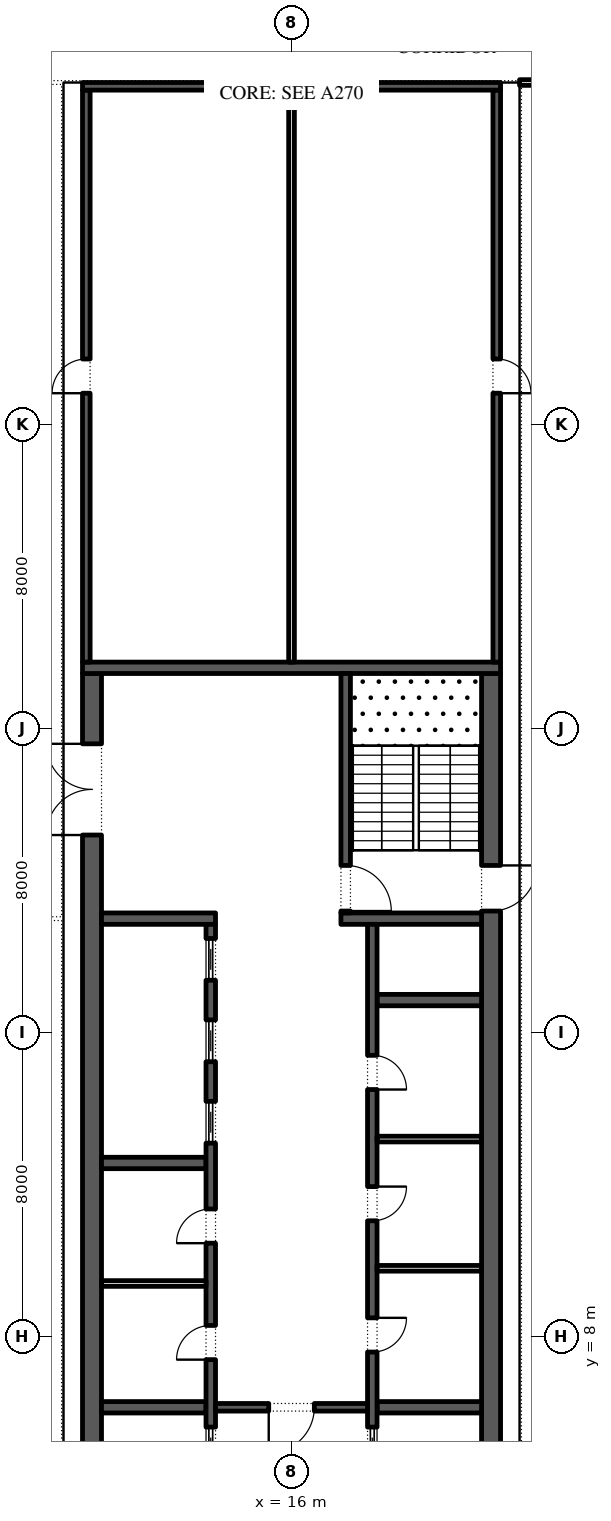
"""IFC4 building model, lengths in metres.
Left out: names, types, materials, properties, quantities, classifications, styles, units other than length and angle.
Written with IfcOpenShell. Run it as: python <this file> out.ifc"""

import sys

from ifc_helpers import new_model, si_unit, direction, frame, frame_2d, origin, place, context, subcontext, project, spatial, rectangle, extrude, element, fill, save


model = new_model("IFC4")
c1 = context("Model", 3, precision=1e-05, world=origin(), true_north=direction((0.0, 1.0)))
c2 = subcontext(c1, "Body", "Model", "MODEL_VIEW")
j1 = project(units=[si_unit("LENGTHUNIT", "METRE"), si_unit("PLANEANGLEUNIT", "RADIAN")], contexts=[c1])
p1 = place(None, origin())
s1 = spatial("IfcSite", under=j1, at=p1, CompositionType="ELEMENT")
p2 = place(p1, origin())
s2 = spatial("IfcBuilding", under=s1, at=p2, CompositionType="ELEMENT")
p3 = place(p2, frame((0.0, 0.0, 309.0)))
s3 = spatial("IfcBuildingStorey", under=s2, at=p3, CompositionType="ELEMENT", Elevation=309.0)
p4 = place(p3, frame((21.25, -2.45, 0.0), z_axis=(0.0, 0.0, 1.0), x_axis=(0.0, 1.0, 0.0)))
e1 = element("IfcWall", 1, at=p4, inside=s3, PredefinedType="SHEAR", context=c2, shape_type="SweptSolid", body=[
    extrude(rectangle(XDim=27.9, YDim=0.5, at=frame_2d((13.95, 0.0))), origin(), (0.0, 0.0, 1.0), 4.0),
])
p5 = place(p4, frame((5.05, 0.0, 0.0)))
e2 = element("IfcOpeningElement", 2, at=p5, cuts=e1, PredefinedType="OPENING", context=c2, shape_type="SweptSolid", body=[
    extrude(rectangle(XDim=1.2, YDim=2.1, at=frame_2d((0.6, 1.05))), frame((0.0, 0.26, 0.0), z_axis=(0.0, -1.0, 0.0), x_axis=(1.0, 0.0, 0.0)), (0.0, 0.0, 1.0), 0.52),
])
p6 = place(p4, frame((21.65, 0.0, 0.0)))
e3 = element("IfcOpeningElement", 3, at=p6, cuts=e1, PredefinedType="OPENING", context=c2, shape_type="SweptSolid", body=[
    extrude(rectangle(XDim=1.2, YDim=2.1, at=frame_2d((0.6, 1.05))), frame((0.0, 0.26, 0.0), z_axis=(0.0, -1.0, 0.0), x_axis=(1.0, 0.0, 0.0)), (0.0, 0.0, 1.0), 0.52),
])
p7 = place(p3, frame((10.75, -2.45, 0.0), z_axis=(0.0, 0.0, 1.0), x_axis=(0.0, 1.0, 0.0)))
e4 = element("IfcWall", 4, at=p7, inside=s3, PredefinedType="SHEAR", context=c2, shape_type="SweptSolid", body=[
    extrude(rectangle(XDim=27.9, YDim=0.5, at=frame_2d((13.95, 0.0))), origin(), (0.0, 0.0, 1.0), 4.0),
])
p8 = place(p7, frame((23.65, 0.0, 0.0)))
e5 = element("IfcOpeningElement", 5, at=p8, cuts=e4, PredefinedType="OPENING", context=c2, shape_type="SweptSolid", body=[
    extrude(rectangle(XDim=2.4, YDim=2.1, at=frame_2d((1.2, 1.05))), frame((0.0, 0.26, 0.0), z_axis=(0.0, -1.0, 0.0), x_axis=(1.0, 0.0, 0.0)), (0.0, 0.0, 1.0), 0.52),
])
p9 = place(p7, frame((1.387, 0.0, 0.0)))
e6 = element("IfcOpeningElement", 6, at=p9, cuts=e4, PredefinedType="OPENING", context=c2, shape_type="SweptSolid", body=[
    extrude(rectangle(XDim=0.9, YDim=2.1, at=frame_2d((0.45, 1.05))), frame((0.0, 0.26, 0.0), z_axis=(0.0, -1.0, 0.0), x_axis=(1.0, 0.0, 0.0)), (0.0, 0.0, 1.0), 0.52),
])
p10 = place(p7, frame((4.562, 0.0, 0.0)))
e7 = element("IfcOpeningElement", 7, at=p10, cuts=e4, PredefinedType="OPENING", context=c2, shape_type="SweptSolid", body=[
    extrude(rectangle(XDim=1.0, YDim=2.1, at=frame_2d((0.5, 1.05))), frame((0.0, 0.26, 0.0), z_axis=(0.0, -1.0, 0.0), x_axis=(1.0, 0.0, 0.0)), (0.0, 0.0, 1.0), 0.52),
])
p11 = place(p3, frame((10.5, 25.6, 0.0), z_axis=(0.0, 0.0, 1.0), x_axis=(1.0, 0.0, 0.0)))
e8 = element("IfcWall", 8, at=p11, inside=s3, PredefinedType="SHEAR", context=c2, shape_type="SweptSolid", body=[
    extrude(rectangle(XDim=11.0, YDim=0.3, at=frame_2d((5.5, 0.0))), origin(), (0.0, 0.0, 1.0), 4.0),
])
p12 = place(p3, frame((17.3, 19.0, 0.0), z_axis=(0.0, 0.0, 1.0), x_axis=(1.0, 0.0, 0.0)))
e9 = element("IfcWall", 9, at=p12, inside=s3, PredefinedType="SHEAR", context=c2, shape_type="SweptSolid", body=[
    extrude(rectangle(XDim=3.7, YDim=0.3, at=frame_2d((1.85, 0.0))), origin(), (0.0, 0.0, 1.0), 4.0),
])
p13 = place(p3, frame((17.425, 19.15, 0.0), z_axis=(0.0, 0.0, 1.0), x_axis=(0.0, 1.0, 0.0)))
e10 = element("IfcWall", 10, at=p13, inside=s3, PredefinedType="SHEAR", context=c2, shape_type="SweptSolid", body=[
    extrude(rectangle(XDim=6.3, YDim=0.25, at=frame_2d((3.15, 0.0))), origin(), (0.0, 0.0, 1.0), 4.0),
])
p14 = place(p13, frame((0.05, 0.0, 0.0)))
e11 = element("IfcOpeningElement", 11, at=p14, cuts=e10, PredefinedType="OPENING", context=c2, shape_type="SweptSolid", body=[
    extrude(rectangle(XDim=1.2, YDim=2.1, at=frame_2d((0.6, 1.05))), frame((0.0, 0.135, 0.0), z_axis=(0.0, -1.0, 0.0), x_axis=(1.0, 0.0, 0.0)), (0.0, 0.0, 1.0), 0.27),
])
for number, where, z_axis, x_axis in (
    (12, (18.25, 6.143, 0.0), (0.0, 0.0, 1.0), (1.0, 0.0, 0.0)),
    (13, (18.25, 16.857, 0.0), (0.0, 0.0, 1.0), (1.0, 0.0, 0.0)),
):
    element("IfcWall", number, at=place(p3, frame(where, z_axis=z_axis, x_axis=x_axis)), inside=s3, PredefinedType="SHEAR", context=c2, shape_type="SweptSolid", body=[
        extrude(rectangle(XDim=2.75, YDim=0.3, at=frame_2d((1.375, 0.0))), origin(), (0.0, 0.0, 1.0), 4.0),
    ])
p15 = place(p3, frame((18.125, 4.15, 0.0), z_axis=(0.0, 0.0, 1.0), x_axis=(0.0, 1.0, 0.0)))
e14 = element("IfcWall", 14, at=p15, inside=s3, PredefinedType="SHEAR", context=c2, shape_type="SweptSolid", body=[
    extrude(rectangle(XDim=14.7, YDim=0.25, at=frame_2d((7.35, 0.0))), origin(), (0.0, 0.0, 1.0), 4.0),
])
p16 = place(p15, frame((3.446, 0.0, 0.0)))
e15 = element("IfcOpeningElement", 15, at=p16, cuts=e14, PredefinedType="OPENING", context=c2, shape_type="SweptSolid", body=[
    extrude(rectangle(XDim=0.9, YDim=2.1, at=frame_2d((0.45, 1.05))), frame((0.0, 0.135, 0.0), z_axis=(0.0, -1.0, 0.0), x_axis=(1.0, 0.0, 0.0)), (0.0, 0.0, 1.0), 0.27),
])
p17 = place(p15, frame((6.9, 0.0, 0.0)))
e16 = element("IfcOpeningElement", 16, at=p17, cuts=e14, PredefinedType="OPENING", context=c2, shape_type="SweptSolid", body=[
    extrude(rectangle(XDim=0.9, YDim=2.1, at=frame_2d((0.45, 1.05))), frame((0.0, 0.135, 0.0), z_axis=(0.0, -1.0, 0.0), x_axis=(1.0, 0.0, 0.0)), (0.0, 0.0, 1.0), 0.27),
])
p18 = place(p15, frame((10.354, 0.0, 0.0)))
e17 = element("IfcOpeningElement", 17, at=p18, cuts=e14, PredefinedType="OPENING", context=c2, shape_type="SweptSolid", body=[
    extrude(rectangle(XDim=0.9, YDim=2.1, at=frame_2d((0.45, 1.05))), frame((0.0, 0.135, 0.0), z_axis=(0.0, -1.0, 0.0), x_axis=(1.0, 0.0, 0.0)), (0.0, 0.0, 1.0), 0.27),
])
p19 = place(p15, frame((0.371, 0.0, 0.0)))
e18 = element("IfcOpeningElement", 18, at=p19, cuts=e14, PredefinedType="OPENING", context=c2, shape_type="SweptSolid", body=[
    extrude(rectangle(XDim=1.1, YDim=2.1, at=frame_2d((0.55, 1.05))), frame((0.0, 0.135, 0.0), z_axis=(0.0, -1.0, 0.0), x_axis=(1.0, 0.0, 0.0)), (0.0, 0.0, 1.0), 0.27),
])
for number, where, z_axis, x_axis in (
    (19, (18.25, 9.8, 0.0), (0.0, 0.0, 1.0), (1.0, 0.0, 0.0)),
    (20, (18.25, 13.2, 0.0), (0.0, 0.0, 1.0), (1.0, 0.0, 0.0)),
):
    element("IfcWall", number, at=place(p3, frame(where, z_axis=z_axis, x_axis=x_axis)), inside=s3, PredefinedType="PARTITIONING", context=c2, shape_type="SweptSolid", body=[
        extrude(rectangle(XDim=2.75, YDim=0.15, at=frame_2d((1.375, 0.0))), origin(), (0.0, 0.0, 1.0), 4.0),
    ])
for number, where, z_axis, x_axis in (
    (21, (11.0, 6.143, 0.0), (0.0, 0.0, 1.0), (1.0, 0.0, 0.0)),
    (22, (11.0, 12.571, 0.0), (0.0, 0.0, 1.0), (1.0, 0.0, 0.0)),
):
    element("IfcWall", number, at=place(p3, frame(where, z_axis=z_axis, x_axis=x_axis)), inside=s3, PredefinedType="SHEAR", context=c2, shape_type="SweptSolid", body=[
        extrude(rectangle(XDim=2.75, YDim=0.3, at=frame_2d((1.375, 0.0))), origin(), (0.0, 0.0, 1.0), 4.0),
    ])
p20 = place(p3, frame((11.0, 19.0, 0.0), z_axis=(0.0, 0.0, 1.0), x_axis=(1.0, 0.0, 0.0)))
e23 = element("IfcWall", 23, at=p20, inside=s3, PredefinedType="SHEAR", context=c2, shape_type="SweptSolid", body=[
    extrude(rectangle(XDim=3.0, YDim=0.3, at=frame_2d((1.5, 0.0))), origin(), (0.0, 0.0, 1.0), 4.0),
])
p21 = place(p3, frame((13.875, -2.45, 0.0), z_axis=(0.0, 0.0, 1.0), x_axis=(0.0, 1.0, 0.0)))
e24 = element("IfcWall", 24, at=p21, inside=s3, PredefinedType="SHEAR", context=c2, shape_type="SweptSolid", body=[
    extrude(rectangle(XDim=21.3, YDim=0.25, at=frame_2d((10.65, 0.0))), origin(), (0.0, 0.0, 1.0), 4.0),
])
p22 = place(p21, frame((9.846, 0.0, 0.0)))
e25 = element("IfcOpeningElement", 25, at=p22, cuts=e24, PredefinedType="OPENING", context=c2, shape_type="SweptSolid", body=[
    extrude(rectangle(XDim=0.9, YDim=2.1, at=frame_2d((0.45, 1.05))), frame((0.0, 0.135, 0.0), z_axis=(0.0, -1.0, 0.0), x_axis=(1.0, 0.0, 0.0)), (0.0, 0.0, 1.0), 0.27),
])
p23 = place(p21, frame((12.911, 0.0, 0.0)))
e26 = element("IfcOpeningElement", 26, at=p23, cuts=e24, PredefinedType="OPENING", context=c2, shape_type="SweptSolid", body=[
    extrude(rectangle(XDim=0.9, YDim=2.1, at=frame_2d((0.45, 1.05))), frame((0.0, 0.135, 0.0), z_axis=(0.0, -1.0, 0.0), x_axis=(1.0, 0.0, 0.0)), (0.0, 0.0, 1.0), 0.27),
])
p24 = place(p21, frame((6.971, 0.0, 0.0)))
e27 = element("IfcOpeningElement", 27, at=p24, cuts=e24, PredefinedType="OPENING", context=c2, shape_type="SweptSolid", body=[
    extrude(rectangle(XDim=1.1, YDim=2.1, at=frame_2d((0.55, 1.05))), frame((0.0, 0.135, 0.0), z_axis=(0.0, -1.0, 0.0), x_axis=(1.0, 0.0, 0.0)), (0.0, 0.0, 1.0), 0.27),
])
p25 = place(p21, frame((15.543, 0.0, 0.0)))
e28 = element("IfcOpeningElement", 28, at=p25, cuts=e24, PredefinedType="OPENING", context=c2, shape_type="SweptSolid", body=[
    extrude(rectangle(XDim=1.1, YDim=2.1, at=frame_2d((0.55, 1.05))), frame((0.0, 0.135, 0.0), z_axis=(0.0, -1.0, 0.0), x_axis=(1.0, 0.0, 0.0)), (0.0, 0.0, 1.0), 0.27),
])
p26 = place(p21, frame((17.686, 0.0, 0.0)))
e29 = element("IfcOpeningElement", 29, at=p26, cuts=e24, PredefinedType="OPENING", context=c2, shape_type="SweptSolid", body=[
    extrude(rectangle(XDim=1.1, YDim=2.1, at=frame_2d((0.55, 1.05))), frame((0.0, 0.135, 0.0), z_axis=(0.0, -1.0, 0.0), x_axis=(1.0, 0.0, 0.0)), (0.0, 0.0, 1.0), 0.27),
])
p27 = place(p21, frame((19.829, 0.0, 0.0)))
e30 = element("IfcOpeningElement", 30, at=p27, cuts=e24, PredefinedType="OPENING", context=c2, shape_type="SweptSolid", body=[
    extrude(rectangle(XDim=1.1, YDim=2.1, at=frame_2d((0.55, 1.05))), frame((0.0, 0.135, 0.0), z_axis=(0.0, -1.0, 0.0), x_axis=(1.0, 0.0, 0.0)), (0.0, 0.0, 1.0), 0.27),
])
p28 = place(p3, frame((11.0, 9.4, 0.0), z_axis=(0.0, 0.0, 1.0), x_axis=(1.0, 0.0, 0.0)))
e31 = element("IfcWall", 31, at=p28, inside=s3, PredefinedType="PARTITIONING", context=c2, shape_type="SweptSolid", body=[
    extrude(rectangle(XDim=2.75, YDim=0.15, at=frame_2d((1.375, 0.0))), origin(), (0.0, 0.0, 1.0), 4.0),
])
p29 = place(p3, frame((14.0, 6.143, 0.0), z_axis=(0.0, 0.0, 1.0), x_axis=(1.0, 0.0, 0.0)))
e32 = element("IfcWall", 32, at=p29, inside=s3, PredefinedType="SHEAR", context=c2, shape_type="SweptSolid", body=[
    extrude(rectangle(XDim=4.0, YDim=0.2, at=frame_2d((2.0, 0.0))), origin(), (0.0, 0.0, 1.0), 4.0),
])
p30 = place(p29, frame((1.4, 0.0, 0.0)))
e33 = element("IfcOpeningElement", 33, at=p30, cuts=e32, PredefinedType="OPENING", context=c2, shape_type="SweptSolid", body=[
    extrude(rectangle(XDim=1.2, YDim=2.1, at=frame_2d((0.6, 1.05))), frame((0.0, 0.11, 0.0), z_axis=(0.0, -1.0, 0.0), x_axis=(1.0, 0.0, 0.0)), (0.0, 0.0, 1.0), 0.22),
])
p31 = place(p3, frame((21.4, 25.75, 0.0), z_axis=(0.0, 0.0, 1.0), x_axis=(0.0, 1.0, 0.0)))
e34 = element("IfcWall", 34, at=p31, inside=s3, PredefinedType="SHEAR", context=c2, shape_type="SweptSolid", body=[
    extrude(rectangle(XDim=15.05, YDim=0.2, at=frame_2d((7.525, 0.0))), origin(), (0.0, 0.0, 1.0), 4.0),
])
p32 = place(p31, frame((7.075, 0.0, 0.0)))
e35 = element("IfcOpeningElement", 35, at=p32, cuts=e34, PredefinedType="OPENING", context=c2, shape_type="SweptSolid", body=[
    extrude(rectangle(XDim=0.9, YDim=2.1, at=frame_2d((0.45, 1.05))), frame((0.0, 0.11, 0.0), z_axis=(0.0, -1.0, 0.0), x_axis=(1.0, 0.0, 0.0)), (0.0, 0.0, 1.0), 0.22),
])
p33 = place(p3, frame((10.6, 25.75, 0.0), z_axis=(0.0, 0.0, 1.0), x_axis=(0.0, 1.0, 0.0)))
e36 = element("IfcWall", 36, at=p33, inside=s3, PredefinedType="SHEAR", context=c2, shape_type="SweptSolid", body=[
    extrude(rectangle(XDim=15.05, YDim=0.2, at=frame_2d((7.525, 0.0))), origin(), (0.0, 0.0, 1.0), 4.0),
])
p34 = place(p33, frame((7.075, 0.0, 0.0)))
e37 = element("IfcOpeningElement", 37, at=p34, cuts=e36, PredefinedType="OPENING", context=c2, shape_type="SweptSolid", body=[
    extrude(rectangle(XDim=0.9, YDim=2.1, at=frame_2d((0.45, 1.05))), frame((0.0, 0.11, 0.0), z_axis=(0.0, -1.0, 0.0), x_axis=(1.0, 0.0, 0.0)), (0.0, 0.0, 1.0), 0.22),
])
p35 = place(p3, frame((10.5, 40.9, 0.0), z_axis=(0.0, 0.0, 1.0), x_axis=(1.0, 0.0, 0.0)))
e38 = element("IfcWall", 38, at=p35, inside=s3, PredefinedType="SHEAR", context=c2, shape_type="SweptSolid", body=[
    extrude(rectangle(XDim=11.0, YDim=0.2, at=frame_2d((5.5, 0.0))), origin(), (0.0, 0.0, 1.0), 4.0),
])
p36 = place(p3, frame((16.0, 25.75, 0.0), z_axis=(0.0, 0.0, 1.0), x_axis=(0.0, 1.0, 0.0)))
e39 = element("IfcWall", 39, at=p36, inside=s3, PredefinedType="PARTITIONING", context=c2, shape_type="SweptSolid", body=[
    extrude(rectangle(XDim=15.05, YDim=0.15, at=frame_2d((7.525, 0.0))), origin(), (0.0, 0.0, 1.0), 4.0),
])
p37 = place(p3, frame((26.05, 41.0, 0.0), z_axis=(0.0, 0.0, 1.0), x_axis=(-1.0, 0.0, 0.0)))
e40 = element("IfcWall", 40, at=p37, inside=s3, PredefinedType="PARTITIONING", context=c2, shape_type="SweptSolid", body=[
    extrude(rectangle(XDim=4.05, YDim=0.15, at=frame_2d((2.025, 0.0))), origin(), (0.0, 0.0, 1.0), 4.0),
])
p38 = place(p37, frame((1.9, 0.0, 0.0)))
e41 = element("IfcOpeningElement", 41, at=p38, cuts=e40, PredefinedType="OPENING", context=c2, shape_type="SweptSolid", body=[
    extrude(rectangle(XDim=1.0, YDim=2.1, at=frame_2d((0.5, 1.05))), frame((0.0, 0.085, 0.0), z_axis=(0.0, -1.0, 0.0), x_axis=(1.0, 0.0, 0.0)), (0.0, 0.0, 1.0), 0.17),
])
p39 = place(p16, frame((0.9, -0.2, 0.0), z_axis=(0.0, 0.0, 1.0), x_axis=(-1.0, 0.0, 0.0)))
e42 = element("IfcDoor", 42, at=p39, inside=s3, OperationType="SINGLE_SWING_RIGHT", PredefinedType="DOOR", context=c2, shape_type="SweptSolid", body=[
    extrude(rectangle(XDim=0.9, YDim=2.1, at=frame_2d((0.45, 1.05))), frame((0.0, -0.075, 0.0), z_axis=(0.0, -1.0, 0.0), x_axis=(1.0, 0.0, 0.0)), (0.0, 0.0, 1.0), 0.05),
])
fill(e15, e42)
p40 = place(p17, frame((0.9, -0.2, 0.0), z_axis=(0.0, 0.0, 1.0), x_axis=(-1.0, 0.0, 0.0)))
e43 = element("IfcDoor", 43, at=p40, inside=s3, OperationType="SINGLE_SWING_RIGHT", PredefinedType="DOOR", context=c2, shape_type="SweptSolid", body=[
    extrude(rectangle(XDim=0.9, YDim=2.1, at=frame_2d((0.45, 1.05))), frame((0.0, -0.075, 0.0), z_axis=(0.0, -1.0, 0.0), x_axis=(1.0, 0.0, 0.0)), (0.0, 0.0, 1.0), 0.05),
])
fill(e16, e43)
p41 = place(p18, frame((0.9, -0.2, 0.0), z_axis=(0.0, 0.0, 1.0), x_axis=(-1.0, 0.0, 0.0)))
e44 = element("IfcDoor", 44, at=p41, inside=s3, OperationType="SINGLE_SWING_LEFT", PredefinedType="DOOR", context=c2, shape_type="SweptSolid", body=[
    extrude(rectangle(XDim=0.9, YDim=2.1, at=frame_2d((0.45, 1.05))), frame((0.0, -0.075, 0.0), z_axis=(0.0, -1.0, 0.0), x_axis=(1.0, 0.0, 0.0)), (0.0, 0.0, 1.0), 0.05),
])
fill(e17, e44)
p42 = place(p19, origin())
e45 = element("IfcDoor", 45, at=p42, inside=s3, OperationType="SLIDING_TO_LEFT", PredefinedType="DOOR", context=c2, shape_type="SweptSolid", body=[
    extrude(rectangle(XDim=1.1, YDim=2.1, at=frame_2d((0.55, 1.05))), frame((0.0, 0.025, 0.0), z_axis=(0.0, -1.0, 0.0), x_axis=(1.0, 0.0, 0.0)), (0.0, 0.0, 1.0), 0.05),
])
fill(e18, e45)
p43 = place(p22, origin())
e46 = element("IfcDoor", 46, at=p43, inside=s3, OperationType="SINGLE_SWING_RIGHT", PredefinedType="DOOR", context=c2, shape_type="SweptSolid", body=[
    extrude(rectangle(XDim=0.9, YDim=2.1, at=frame_2d((0.45, 1.05))), frame((0.0, 0.125, 0.0), z_axis=(0.0, -1.0, 0.0), x_axis=(1.0, 0.0, 0.0)), (0.0, 0.0, 1.0), 0.05),
])
fill(e25, e46)
p44 = place(p23, origin())
e47 = element("IfcDoor", 47, at=p44, inside=s3, OperationType="SINGLE_SWING_RIGHT", PredefinedType="DOOR", context=c2, shape_type="SweptSolid", body=[
    extrude(rectangle(XDim=0.9, YDim=2.1, at=frame_2d((0.45, 1.05))), frame((0.0, 0.125, 0.0), z_axis=(0.0, -1.0, 0.0), x_axis=(1.0, 0.0, 0.0)), (0.0, 0.0, 1.0), 0.05),
])
fill(e26, e47)
p45 = place(p24, origin())
e48 = element("IfcDoor", 48, at=p45, inside=s3, OperationType="SLIDING_TO_LEFT", PredefinedType="DOOR", context=c2, shape_type="SweptSolid", body=[
    extrude(rectangle(XDim=1.1, YDim=2.1, at=frame_2d((0.55, 1.05))), frame((0.0, 0.025, 0.0), z_axis=(0.0, -1.0, 0.0), x_axis=(1.0, 0.0, 0.0)), (0.0, 0.0, 1.0), 0.05),
])
fill(e27, e48)
p46 = place(p25, origin())
e49 = element("IfcDoor", 49, at=p46, inside=s3, OperationType="SLIDING_TO_LEFT", PredefinedType="DOOR", context=c2, shape_type="SweptSolid", body=[
    extrude(rectangle(XDim=1.1, YDim=2.1, at=frame_2d((0.55, 1.05))), frame((0.0, 0.025, 0.0), z_axis=(0.0, -1.0, 0.0), x_axis=(1.0, 0.0, 0.0)), (0.0, 0.0, 1.0), 0.05),
])
fill(e28, e49)
p47 = place(p26, origin())
e50 = element("IfcDoor", 50, at=p47, inside=s3, OperationType="SLIDING_TO_LEFT", PredefinedType="DOOR", context=c2, shape_type="SweptSolid", body=[
    extrude(rectangle(XDim=1.1, YDim=2.1, at=frame_2d((0.55, 1.05))), frame((0.0, 0.025, 0.0), z_axis=(0.0, -1.0, 0.0), x_axis=(1.0, 0.0, 0.0)), (0.0, 0.0, 1.0), 0.05),
])
fill(e29, e50)
p48 = place(p27, origin())
e51 = element("IfcDoor", 51, at=p48, inside=s3, OperationType="SLIDING_TO_LEFT", PredefinedType="DOOR", context=c2, shape_type="SweptSolid", body=[
    extrude(rectangle(XDim=1.1, YDim=2.1, at=frame_2d((0.55, 1.05))), frame((0.0, 0.025, 0.0), z_axis=(0.0, -1.0, 0.0), x_axis=(1.0, 0.0, 0.0)), (0.0, 0.0, 1.0), 0.05),
])
fill(e30, e51)
p49 = place(p30, frame((1.2, 0.0, 0.0), z_axis=(0.0, 0.0, 1.0), x_axis=(-1.0, 0.0, 0.0)))
e52 = element("IfcDoor", 52, at=p49, inside=s3, OperationType="SINGLE_SWING_LEFT", PredefinedType="DOOR", context=c2, shape_type="SweptSolid", body=[
    extrude(rectangle(XDim=1.2, YDim=2.1, at=frame_2d((0.6, 1.05))), frame((0.0, 0.025, 0.0), z_axis=(0.0, -1.0, 0.0), x_axis=(1.0, 0.0, 0.0)), (0.0, 0.0, 1.0), 0.05),
])
fill(e33, e52)
p50 = place(p8, origin())
e53 = element("IfcDoor", 53, at=p50, inside=s3, OperationType="DOUBLE_DOOR_SINGLE_SWING", PredefinedType="DOOR", context=c2, shape_type="SweptSolid", body=[
    extrude(rectangle(XDim=2.4, YDim=2.1, at=frame_2d((1.2, 1.05))), frame((0.0, 0.025, 0.0), z_axis=(0.0, -1.0, 0.0), x_axis=(1.0, 0.0, 0.0)), (0.0, 0.0, 1.0), 0.05),
])
fill(e5, e53)
p51 = place(p14, frame((1.2, 0.0, 0.0), z_axis=(0.0, 0.0, 1.0), x_axis=(-1.0, 0.0, 0.0)))
e54 = element("IfcDoor", 54, at=p51, inside=s3, OperationType="SINGLE_SWING_LEFT", PredefinedType="DOOR", context=c2, shape_type="SweptSolid", body=[
    extrude(rectangle(XDim=1.2, YDim=2.1, at=frame_2d((0.6, 1.05))), frame((0.0, 0.025, 0.0), z_axis=(0.0, -1.0, 0.0), x_axis=(1.0, 0.0, 0.0)), (0.0, 0.0, 1.0), 0.05),
])
fill(e11, e54)
p52 = place(p6, frame((1.2, 0.0, 0.0), z_axis=(0.0, 0.0, 1.0), x_axis=(-1.0, 0.0, 0.0)))
e55 = element("IfcDoor", 55, at=p52, inside=s3, OperationType="SINGLE_SWING_RIGHT", PredefinedType="DOOR", context=c2, shape_type="SweptSolid", body=[
    extrude(rectangle(XDim=1.2, YDim=2.1, at=frame_2d((0.6, 1.05))), frame((0.0, 0.025, 0.0), z_axis=(0.0, -1.0, 0.0), x_axis=(1.0, 0.0, 0.0)), (0.0, 0.0, 1.0), 0.05),
])
fill(e3, e55)
p53 = place(p32, frame((0.9, 0.15, 0.0), z_axis=(0.0, 0.0, 1.0), x_axis=(-1.0, 0.0, 0.0)))
e56 = element("IfcDoor", 56, at=p53, inside=s3, OperationType="SINGLE_SWING_LEFT", PredefinedType="DOOR", context=c2, shape_type="SweptSolid", body=[
    extrude(rectangle(XDim=0.9, YDim=2.1, at=frame_2d((0.45, 1.05))), frame((0.0, 0.1, 0.0), z_axis=(0.0, -1.0, 0.0), x_axis=(1.0, 0.0, 0.0)), (0.0, 0.0, 1.0), 0.05),
])
fill(e35, e56)
p54 = place(p34, origin())
e57 = element("IfcDoor", 57, at=p54, inside=s3, OperationType="SINGLE_SWING_RIGHT", PredefinedType="DOOR", context=c2, shape_type="SweptSolid", body=[
    extrude(rectangle(XDim=0.9, YDim=2.1, at=frame_2d((0.45, 1.05))), frame((0.0, -0.05, 0.0), z_axis=(0.0, -1.0, 0.0), x_axis=(1.0, 0.0, 0.0)), (0.0, 0.0, 1.0), 0.05),
])
fill(e37, e57)
save(model, sys.argv[1])
